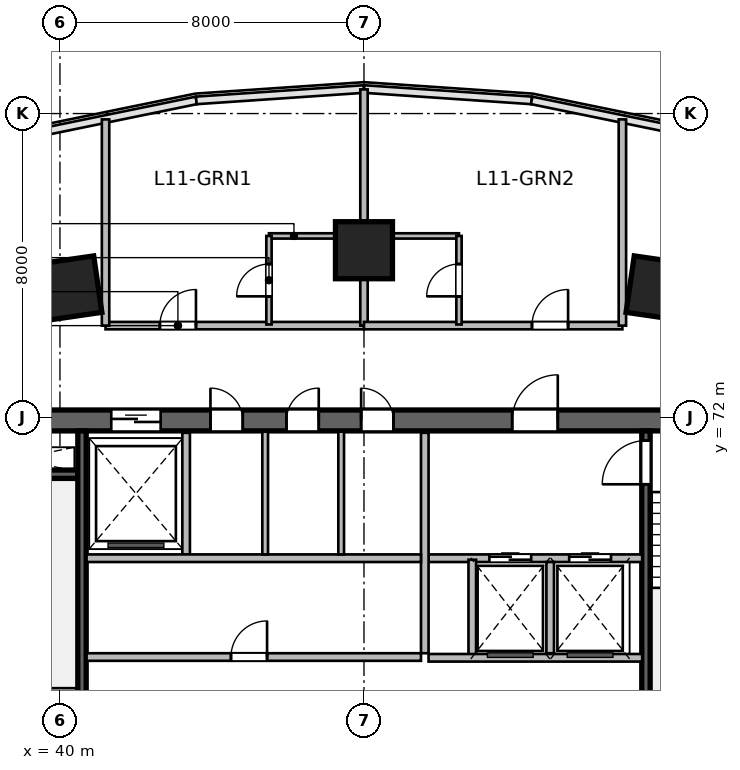
"""IFC4 building model, lengths in metres.
Left out: names, types, materials, properties, quantities, classifications, styles, units other than length and angle.
Written with IfcOpenShell. Run it as: python <this file> out.ifc"""

import sys

from ifc_helpers import new_model, si_unit, direction, frame, frame_2d, origin, origin_2d, place, context, subcontext, project, spatial, rectangle, extrude, source, transform, mapped, element, fill, save


model = new_model("IFC4")
c1 = context("Model", 3, precision=1e-05, world=origin(), true_north=direction((0.0, 1.0)))
c2 = subcontext(c1, "Body", "Model", "MODEL_VIEW")
j1 = project(units=[si_unit("LENGTHUNIT", "METRE"), si_unit("PLANEANGLEUNIT", "RADIAN")], contexts=[c1])
p1 = place(None, origin())
s1 = spatial("IfcSite", under=j1, at=p1, CompositionType="ELEMENT")
p2 = place(p1, origin())
s2 = spatial("IfcBuilding", under=s1, at=p2, CompositionType="ELEMENT")
p3 = place(p2, frame((0.0, 0.0, 53.4)))
s3 = spatial("IfcBuildingStorey", under=s2, at=p3, CompositionType="ELEMENT", Elevation=53.4)
m1 = source(origin(), c2, "Body", "SweptSolid", [
    extrude(rectangle(XDim=21.6, YDim=0.55, at=frame_2d((10.8, 0.0))), origin(), (0.0, 0.0, 1.0), 3.6),
])
p4 = place(p3, frame((37.2, 71.925, 0.0), z_axis=(0.0, 0.0, 1.0), x_axis=(1.0, 0.0, 0.0)))
e1 = element("IfcWall", 1, at=p4, inside=s3, PredefinedType="SHEAR", context=c2, shape_type="MappedRepresentation", body=[
    mapped(m1, transform((0.0, 0.0, 0.0), scale=1.0)),
])
p5 = place(p4, frame((1.2, 0.0, 0.0)))
e2 = element("IfcOpeningElement", 2, at=p5, cuts=e1, PredefinedType="OPENING", context=c2, shape_type="SweptSolid", body=[
    extrude(rectangle(XDim=0.9, YDim=2.1, at=frame_2d((0.45, 1.05))), frame((0.0, 0.285, 0.0), z_axis=(0.0, -1.0, 0.0), x_axis=(1.0, 0.0, 0.0)), (0.0, 0.0, 1.0), 0.57),
])
p6 = place(p4, frame((14.7, 0.0, 0.0)))
e3 = element("IfcOpeningElement", 3, at=p6, cuts=e1, PredefinedType="OPENING", context=c2, shape_type="SweptSolid", body=[
    extrude(rectangle(XDim=1.2, YDim=2.15, at=frame_2d((0.6, 1.075))), frame((0.0, 0.285, 0.0), z_axis=(0.0, -1.0, 0.0), x_axis=(1.0, 0.0, 0.0)), (0.0, 0.0, 1.0), 0.57),
])
p7 = place(p4, frame((4.15, 0.0, 0.0)))
e4 = element("IfcOpeningElement", 4, at=p7, cuts=e1, PredefinedType="OPENING", context=c2, shape_type="SweptSolid", body=[
    extrude(rectangle(XDim=1.3, YDim=2.15, at=frame_2d((0.65, 1.075))), frame((0.0, 0.285, 0.0), z_axis=(0.0, -1.0, 0.0), x_axis=(1.0, 0.0, 0.0)), (0.0, 0.0, 1.0), 0.57),
])
p8 = place(p4, frame((6.76, 0.0, 0.0)))
e5 = element("IfcOpeningElement", 5, at=p8, cuts=e1, PredefinedType="OPENING", context=c2, shape_type="SweptSolid", body=[
    extrude(rectangle(XDim=0.85, YDim=2.1, at=frame_2d((0.425, 1.05))), frame((0.0, 0.285, 0.0), z_axis=(0.0, -1.0, 0.0), x_axis=(1.0, 0.0, 0.0)), (0.0, 0.0, 1.0), 0.57),
])
p9 = place(p4, frame((8.76, 0.0, 0.0)))
e6 = element("IfcOpeningElement", 6, at=p9, cuts=e1, PredefinedType="OPENING", context=c2, shape_type="SweptSolid", body=[
    extrude(rectangle(XDim=0.85, YDim=2.1, at=frame_2d((0.425, 1.05))), frame((0.0, 0.285, 0.0), z_axis=(0.0, -1.0, 0.0), x_axis=(1.0, 0.0, 0.0)), (0.0, 0.0, 1.0), 0.57),
])
p10 = place(p4, frame((10.725, 0.0, 0.0)))
e7 = element("IfcOpeningElement", 7, at=p10, cuts=e1, PredefinedType="OPENING", context=c2, shape_type="SweptSolid", body=[
    extrude(rectangle(XDim=0.85, YDim=2.1, at=frame_2d((0.425, 1.05))), frame((0.0, 0.285, 0.0), z_axis=(0.0, -1.0, 0.0), x_axis=(1.0, 0.0, 0.0)), (0.0, 0.0, 1.0), 0.57),
])
m2 = source(origin(), c2, "Body", "SweptSolid", [
    extrude(rectangle(XDim=3.27, YDim=0.22, at=frame_2d((1.635, 0.0))), origin(), (0.0, 0.0, 1.0), 3.6),
])
p11 = place(p3, frame((37.2, 70.51, 0.0), z_axis=(0.0, 0.0, 1.0), x_axis=(1.0, 0.0, 0.0)))
e8 = element("IfcWall", 8, at=p11, inside=s3, PredefinedType="SHEAR", context=c2, shape_type="MappedRepresentation", body=[
    mapped(m2, transform((0.0, 0.0, 0.0), scale=1.0)),
])
m3 = source(origin(), c2, "Body", "SweptSolid", [
    extrude(rectangle(XDim=10.9, YDim=0.22, at=frame_2d((5.45, 0.0))), origin(), (0.0, 0.0, 1.0), 3.6),
])
p12 = place(p3, frame((40.58, 60.75, 0.0), z_axis=(0.0, 0.0, 1.0), x_axis=(0.0, 1.0, 0.0)))
e9 = element("IfcWall", 9, at=p12, inside=s3, PredefinedType="SHEAR", context=c2, shape_type="MappedRepresentation", body=[
    mapped(m3, transform((0.0, 0.0, 0.0), scale=1.0)),
])
p13 = place(p3, frame((55.42, 60.75, 0.0), z_axis=(0.0, 0.0, 1.0), x_axis=(0.0, 1.0, 0.0)))
e10 = element("IfcWall", 10, at=p13, inside=s3, PredefinedType="SHEAR", context=c2, shape_type="MappedRepresentation", body=[
    mapped(m3, transform((0.0, 0.0, 0.0), scale=1.0)),
])
p14 = place(p13, frame((9.495, 0.0, 0.0)))
e11 = element("IfcOpeningElement", 11, at=p14, cuts=e10, PredefinedType="OPENING", context=c2, shape_type="SweptSolid", body=[
    extrude(rectangle(XDim=1.15, YDim=2.15, at=frame_2d((0.575, 1.075))), frame((0.0, 0.12, 0.0), z_axis=(0.0, -1.0, 0.0), x_axis=(1.0, 0.0, 0.0)), (0.0, 0.0, 1.0), 0.24),
])
m4 = source(origin(), c2, "Body", "SweptSolid", [
    extrude(rectangle(XDim=1.5, YDim=1.5, at=origin_2d()), origin(), (0.0, 0.0, 1.0), 3.6),
])
for number, where, z_axis, x_axis in (
    (12, (40.253, 75.404, 0.0), (0.0, 0.0, 1.0), (-0.143, 0.99, 0.0)),
    (13, (48.0, 76.404, 0.0), (0.0, 0.0, 1.0), (0.0, 1.0, 0.0)),
    (14, (55.747, 75.404, 0.0), (0.0, 0.0, 1.0), (0.143, 0.99, 0.0)),
):
    element("IfcColumn", number, at=place(p3, frame(where, z_axis=z_axis, x_axis=x_axis)), inside=s3, PredefinedType="COLUMN", context=c2, shape_type="MappedRepresentation", body=[
        mapped(m4, transform((0.0, 0.0, 0.0), scale=1.0)),
    ])
m5 = source(origin(), c2, "Body", "SweptSolid", [
    extrude(rectangle(XDim=5.62, YDim=0.2, at=frame_2d((2.81, 0.0))), origin(), (0.0, 0.0, 1.0), 3.36),
])
p15 = place(p3, frame((49.7, 68.3, 0.0), z_axis=(0.0, 0.0, 1.0), x_axis=(1.0, 0.0, 0.0)))
e15 = element("IfcWall", 15, at=p15, inside=s3, PredefinedType="SOLIDWALL", context=c2, shape_type="MappedRepresentation", body=[
    mapped(m5, transform((0.0, 0.0, 0.0), scale=1.0)),
])
p16 = place(p15, frame((1.6, 0.0, 0.0)))
e16 = element("IfcOpeningElement", 16, at=p16, cuts=e15, PredefinedType="OPENING", context=c2, shape_type="SweptSolid", body=[
    extrude(rectangle(XDim=1.1, YDim=2.15, at=frame_2d((0.55, 1.075))), frame((0.0, 0.11, 0.0), z_axis=(0.0, -1.0, 0.0), x_axis=(1.0, 0.0, 0.0)), (0.0, 0.0, 1.0), 0.22),
])
p17 = place(p15, frame((3.7, 0.0, 0.0)))
e17 = element("IfcOpeningElement", 17, at=p17, cuts=e15, PredefinedType="OPENING", context=c2, shape_type="SweptSolid", body=[
    extrude(rectangle(XDim=1.1, YDim=2.15, at=frame_2d((0.55, 1.075))), frame((0.0, 0.11, 0.0), z_axis=(0.0, -1.0, 0.0), x_axis=(1.0, 0.0, 0.0)), (0.0, 0.0, 1.0), 0.22),
])
m6 = source(origin(), c2, "Body", "SweptSolid", [
    extrude(rectangle(XDim=5.8, YDim=0.2, at=frame_2d((2.9, 0.0))), origin(), (0.0, 0.0, 1.0), 3.36),
])
p18 = place(p3, frame((49.6, 65.8, 0.0), z_axis=(0.0, 0.0, 1.0), x_axis=(0.0, 1.0, 0.0)))
e18 = element("IfcWall", 18, at=p18, inside=s3, PredefinedType="SOLIDWALL", context=c2, shape_type="MappedRepresentation", body=[
    mapped(m6, transform((0.0, 0.0, 0.0), scale=1.0)),
])
m7 = source(origin(), c2, "Body", "SweptSolid", [
    extrude(rectangle(XDim=2.58, YDim=0.2, at=frame_2d((1.29, 0.0))), origin(), (0.0, 0.0, 1.0), 3.36),
])
p19 = place(p3, frame((50.85, 65.68, 0.0), z_axis=(0.0, 0.0, 1.0), x_axis=(0.0, 1.0, 0.0)))
e19 = element("IfcWall", 19, at=p19, inside=s3, PredefinedType="SOLIDWALL", context=c2, shape_type="MappedRepresentation", body=[
    mapped(m7, transform((0.0, 0.0, 0.0), scale=1.0)),
])
m8 = source(origin(), c2, "Body", "SweptSolid", [
    extrude(rectangle(XDim=2.4, YDim=0.2, at=frame_2d((1.2, 0.0))), origin(), (0.0, 0.0, 1.0), 3.36),
])
p20 = place(p3, frame((52.9, 65.8, 0.0), z_axis=(0.0, 0.0, 1.0), x_axis=(0.0, 1.0, 0.0)))
e20 = element("IfcWall", 20, at=p20, inside=s3, PredefinedType="SOLIDWALL", context=c2, shape_type="MappedRepresentation", body=[
    mapped(m8, transform((0.0, 0.0, 0.0), scale=1.0)),
])
p21 = place(p3, frame((49.7, 65.68, 0.0), z_axis=(0.0, 0.0, 1.0), x_axis=(1.0, 0.0, 0.0)))
e21 = element("IfcWall", 21, at=p21, inside=s3, PredefinedType="SOLIDWALL", context=c2, shape_type="MappedRepresentation", body=[
    mapped(m5, transform((0.0, 0.0, 0.0), scale=1.0)),
])
m9 = source(origin(), c2, "Body", "SweptSolid", [
    extrude(rectangle(XDim=3.2, YDim=0.2, at=frame_2d((1.6, 0.0))), origin(), (0.0, 0.0, 1.0), 3.36),
])
p22 = place(p3, frame((43.32, 68.4, 0.0), z_axis=(0.0, 0.0, 1.0), x_axis=(0.0, 1.0, 0.0)))
e22 = element("IfcWall", 22, at=p22, inside=s3, PredefinedType="SOLIDWALL", context=c2, shape_type="MappedRepresentation", body=[
    mapped(m9, transform((0.0, 0.0, 0.0), scale=1.0)),
])
m10 = source(origin(), c2, "Body", "SweptSolid", [
    extrude(rectangle(XDim=8.8, YDim=0.2, at=frame_2d((4.4, 0.0))), origin(), (0.0, 0.0, 1.0), 3.36),
])
p23 = place(p3, frame((40.7, 68.3, 0.0), z_axis=(0.0, 0.0, 1.0), x_axis=(1.0, 0.0, 0.0)))
e23 = element("IfcWall", 23, at=p23, inside=s3, PredefinedType="SOLIDWALL", context=c2, shape_type="MappedRepresentation", body=[
    mapped(m10, transform((0.0, 0.0, 0.0), scale=1.0)),
])
m11 = source(origin(), c2, "Body", "SweptSolid", [
    extrude(rectangle(XDim=3.23, YDim=0.15, at=frame_2d((1.615, 0.0))), origin(), (0.0, 0.0, 1.0), 3.36),
])
for number, where, z_axis, x_axis in (
    (24, (45.4, 68.4, 0.0), (0.0, 0.0, 1.0), (0.0, 1.0, 0.0)),
    (25, (47.4, 68.4, 0.0), (0.0, 0.0, 1.0), (0.0, 1.0, 0.0)),
):
    element("IfcWall", number, at=place(p3, frame(where, z_axis=z_axis, x_axis=x_axis)), inside=s3, PredefinedType="PARTITIONING", context=c2, shape_type="MappedRepresentation", body=[
        mapped(m11, transform((0.0, 0.0, 0.0), scale=1.0)),
    ])
p24 = place(p3, frame((40.7, 65.7, 0.0), z_axis=(0.0, 0.0, 1.0), x_axis=(1.0, 0.0, 0.0)))
e26 = element("IfcWall", 26, at=p24, inside=s3, PredefinedType="SOLIDWALL", context=c2, shape_type="MappedRepresentation", body=[
    mapped(m10, transform((0.0, 0.0, 0.0), scale=1.0)),
])
p25 = place(p24, frame((3.8, 0.0, 0.0)))
e27 = element("IfcOpeningElement", 27, at=p25, cuts=e26, PredefinedType="OPENING", context=c2, shape_type="SweptSolid", body=[
    extrude(rectangle(XDim=0.95, YDim=2.15, at=frame_2d((0.475, 1.075))), frame((0.0, 0.11, 0.0), z_axis=(0.0, -1.0, 0.0), x_axis=(1.0, 0.0, 0.0)), (0.0, 0.0, 1.0), 0.22),
])
m12 = source(origin(), c2, "Body", "SweptSolid", [
    extrude(rectangle(XDim=6.8, YDim=0.195, at=frame_2d((3.4, 0.0))), origin(), (0.0, 0.0, 1.0), 3.36),
])
p26 = place(p3, frame((41.2, 74.42, 0.0), z_axis=(0.0, 0.0, 1.0), x_axis=(1.0, 0.0, 0.0)))
e28 = element("IfcWall", 28, at=p26, inside=s3, PredefinedType="PARTITIONING", context=c2, shape_type="MappedRepresentation", body=[
    mapped(m12, transform((0.0, 0.0, 0.0), scale=1.0)),
])
p27 = place(p26, frame((1.429, 0.0, 0.0)))
e29 = element("IfcOpeningElement", 29, at=p27, cuts=e28, PredefinedType="OPENING", context=c2, shape_type="SweptSolid", body=[
    extrude(rectangle(XDim=0.95, YDim=2.15, at=frame_2d((0.475, 1.075))), frame((0.0, 0.107, 0.0), z_axis=(0.0, -1.0, 0.0), x_axis=(1.0, 0.0, 0.0)), (0.0, 0.0, 1.0), 0.215),
])
m13 = source(origin(), c2, "Body", "SweptSolid", [
    extrude(rectangle(XDim=6.216, YDim=0.195, at=frame_2d((3.108, 0.0))), origin(), (0.0, 0.0, 1.0), 2.644),
])
p28 = place(p3, frame((48.0, 74.42, 0.0), z_axis=(0.0, 0.0, 1.0), x_axis=(0.0, 1.0, 0.0)))
e30 = element("IfcWall", 30, at=p28, inside=s3, PredefinedType="PARTITIONING", context=c2, shape_type="MappedRepresentation", body=[
    mapped(m13, transform((0.0, 0.0, 0.0), scale=1.0)),
])
m14 = source(origin(), c2, "Body", "SweptSolid", [
    extrude(rectangle(XDim=5.426, YDim=0.195, at=frame_2d((2.713, 0.0))), origin(), (0.0, 0.0, 1.0), 3.36),
])
p29 = place(p3, frame((41.2, 74.42, 0.0), z_axis=(0.0, 0.0, 1.0), x_axis=(0.0, 1.0, 0.0)))
e31 = element("IfcWall", 31, at=p29, inside=s3, PredefinedType="PARTITIONING", context=c2, shape_type="MappedRepresentation", body=[
    mapped(m14, transform((0.0, 0.0, 0.0), scale=1.0)),
])
m15 = source(origin(), c2, "Body", "SweptSolid", [
    extrude(rectangle(XDim=2.35, YDim=0.14, at=frame_2d((1.175, 0.0))), origin(), (0.0, 0.0, 1.0), 3.36),
])
p30 = place(p3, frame((45.5, 76.78, 0.0), z_axis=(0.0, 0.0, 1.0), x_axis=(1.0, 0.0, 0.0)))
e32 = element("IfcWall", 32, at=p30, inside=s3, PredefinedType="PARTITIONING", context=c2, shape_type="MappedRepresentation", body=[
    mapped(m15, transform((0.0, 0.0, 0.0), scale=1.0)),
])
m16 = source(origin(), c2, "Body", "SweptSolid", [
    extrude(rectangle(XDim=2.33, YDim=0.14, at=frame_2d((1.165, 0.0))), origin(), (0.0, 0.0, 1.0), 3.36),
])
p31 = place(p3, frame((45.5, 74.45, 0.0), z_axis=(0.0, 0.0, 1.0), x_axis=(0.0, 1.0, 0.0)))
e33 = element("IfcWall", 33, at=p31, inside=s3, PredefinedType="PARTITIONING", context=c2, shape_type="MappedRepresentation", body=[
    mapped(m16, transform((0.0, 0.0, 0.0), scale=1.0)),
])
p32 = place(p31, frame((0.74, 0.0, 0.0)))
e34 = element("IfcOpeningElement", 34, at=p32, cuts=e33, PredefinedType="OPENING", context=c2, shape_type="SweptSolid", body=[
    extrude(rectangle(XDim=0.85, YDim=2.05, at=frame_2d((0.425, 1.025))), frame((0.0, 0.08, 0.0), z_axis=(0.0, -1.0, 0.0), x_axis=(1.0, 0.0, 0.0)), (0.0, 0.0, 1.0), 0.16),
])
p33 = place(p3, frame((48.0, 74.42, 0.0), z_axis=(0.0, 0.0, 1.0), x_axis=(1.0, 0.0, 0.0)))
e35 = element("IfcWall", 35, at=p33, inside=s3, PredefinedType="PARTITIONING", context=c2, shape_type="MappedRepresentation", body=[
    mapped(m12, transform((0.0, 0.0, 0.0), scale=1.0)),
])
p34 = place(p33, frame((4.421, 0.0, 0.0)))
e36 = element("IfcOpeningElement", 36, at=p34, cuts=e35, PredefinedType="OPENING", context=c2, shape_type="SweptSolid", body=[
    extrude(rectangle(XDim=0.95, YDim=2.15, at=frame_2d((0.475, 1.075))), frame((0.0, 0.107, 0.0), z_axis=(0.0, -1.0, 0.0), x_axis=(1.0, 0.0, 0.0)), (0.0, 0.0, 1.0), 0.215),
])
p35 = place(p3, frame((54.8, 74.42, 0.0), z_axis=(0.0, 0.0, 1.0), x_axis=(0.0, 1.0, 0.0)))
e37 = element("IfcWall", 37, at=p35, inside=s3, PredefinedType="PARTITIONING", context=c2, shape_type="MappedRepresentation", body=[
    mapped(m14, transform((0.0, 0.0, 0.0), scale=1.0)),
])
p36 = place(p3, frame((48.15, 76.78, 0.0), z_axis=(0.0, 0.0, 1.0), x_axis=(1.0, 0.0, 0.0)))
e38 = element("IfcWall", 38, at=p36, inside=s3, PredefinedType="PARTITIONING", context=c2, shape_type="MappedRepresentation", body=[
    mapped(m15, transform((0.0, 0.0, 0.0), scale=1.0)),
])
p37 = place(p3, frame((50.5, 74.45, 0.0), z_axis=(0.0, 0.0, 1.0), x_axis=(0.0, 1.0, 0.0)))
e39 = element("IfcWall", 39, at=p37, inside=s3, PredefinedType="PARTITIONING", context=c2, shape_type="MappedRepresentation", body=[
    mapped(m16, transform((0.0, 0.0, 0.0), scale=1.0)),
])
p38 = place(p37, frame((0.74, 0.0, 0.0)))
e40 = element("IfcOpeningElement", 40, at=p38, cuts=e39, PredefinedType="OPENING", context=c2, shape_type="SweptSolid", body=[
    extrude(rectangle(XDim=0.85, YDim=2.05, at=frame_2d((0.425, 1.025))), frame((0.0, 0.08, 0.0), z_axis=(0.0, -1.0, 0.0), x_axis=(1.0, 0.0, 0.0)), (0.0, 0.0, 1.0), 0.16),
])
m17 = source(origin(), c2, "Body", "SweptSolid", [
    extrude(rectangle(XDim=1.15, YDim=2.15, at=frame_2d((0.575, 1.075))), frame((0.0, 0.025, 0.0), z_axis=(0.0, -1.0, 0.0), x_axis=(1.0, 0.0, 0.0)), (0.0, 0.0, 1.0), 0.05),
])
p39 = place(p14, origin())
e41 = element("IfcDoor", 41, at=p39, inside=s3, OperationType="SINGLE_SWING_LEFT", PredefinedType="DOOR", context=c2, shape_type="MappedRepresentation", body=[
    mapped(m17, transform((0.0, 0.0, 0.0), scale=1.0)),
])
fill(e11, e41)
m18 = source(origin(), c2, "Body", "SweptSolid", [
    extrude(rectangle(XDim=1.2, YDim=2.15, at=frame_2d((0.6, 1.075))), frame((0.0, 0.025, 0.0), z_axis=(0.0, -1.0, 0.0), x_axis=(1.0, 0.0, 0.0)), (0.0, 0.0, 1.0), 0.05),
])
p40 = place(p6, origin())
e42 = element("IfcDoor", 42, at=p40, inside=s3, OperationType="SINGLE_SWING_RIGHT", PredefinedType="DOOR", context=c2, shape_type="MappedRepresentation", body=[
    mapped(m18, transform((0.0, 0.0, 0.0), scale=1.0)),
])
fill(e3, e42)
m19 = source(origin(), c2, "Body", "SweptSolid", [
    extrude(rectangle(XDim=1.1, YDim=2.15, at=frame_2d((0.55, 1.075))), frame((0.0, 0.025, 0.0), z_axis=(0.0, -1.0, 0.0), x_axis=(1.0, 0.0, 0.0)), (0.0, 0.0, 1.0), 0.05),
])
p41 = place(p16, origin())
e43 = element("IfcDoor", 43, at=p41, inside=s3, OperationType="DOUBLE_DOOR_SLIDING", PredefinedType="DOOR", context=c2, shape_type="MappedRepresentation", body=[
    mapped(m19, transform((0.0, 0.0, 0.0), scale=1.0)),
])
fill(e16, e43)
p42 = place(p17, origin())
e44 = element("IfcDoor", 44, at=p42, inside=s3, OperationType="DOUBLE_DOOR_SLIDING", PredefinedType="DOOR", context=c2, shape_type="MappedRepresentation", body=[
    mapped(m19, transform((0.0, 0.0, 0.0), scale=1.0)),
])
fill(e17, e44)
m20 = source(origin(), c2, "Body", "SweptSolid", [
    extrude(rectangle(XDim=1.3, YDim=2.15, at=frame_2d((0.65, 1.075))), frame((0.0, 0.025, 0.0), z_axis=(0.0, -1.0, 0.0), x_axis=(1.0, 0.0, 0.0)), (0.0, 0.0, 1.0), 0.05),
])
p43 = place(p7, origin())
e45 = element("IfcDoor", 45, at=p43, inside=s3, OperationType="DOUBLE_DOOR_SLIDING", PredefinedType="DOOR", context=c2, shape_type="MappedRepresentation", body=[
    mapped(m20, transform((0.0, 0.0, 0.0), scale=1.0)),
])
fill(e4, e45)
m21 = source(origin(), c2, "Body", "SweptSolid", [
    extrude(rectangle(XDim=0.85, YDim=2.1, at=frame_2d((0.425, 1.05))), frame((0.0, 0.025, 0.0), z_axis=(0.0, -1.0, 0.0), x_axis=(1.0, 0.0, 0.0)), (0.0, 0.0, 1.0), 0.05),
])
p44 = place(p8, origin())
e46 = element("IfcDoor", 46, at=p44, inside=s3, OperationType="SINGLE_SWING_LEFT", PredefinedType="DOOR", context=c2, shape_type="MappedRepresentation", body=[
    mapped(m21, transform((0.0, 0.0, 0.0), scale=1.0)),
])
fill(e5, e46)
p45 = place(p9, origin())
e47 = element("IfcDoor", 47, at=p45, inside=s3, OperationType="SINGLE_SWING_RIGHT", PredefinedType="DOOR", context=c2, shape_type="MappedRepresentation", body=[
    mapped(m21, transform((0.0, 0.0, 0.0), scale=1.0)),
])
fill(e6, e47)
p46 = place(p10, origin())
e48 = element("IfcDoor", 48, at=p46, inside=s3, OperationType="SINGLE_SWING_LEFT", PredefinedType="DOOR", context=c2, shape_type="MappedRepresentation", body=[
    mapped(m21, transform((0.0, 0.0, 0.0), scale=1.0)),
])
fill(e7, e48)
m22 = source(origin(), c2, "Body", "SweptSolid", [
    extrude(rectangle(XDim=0.95, YDim=2.15, at=frame_2d((0.475, 1.075))), frame((0.0, 0.025, 0.0), z_axis=(0.0, -1.0, 0.0), x_axis=(1.0, 0.0, 0.0)), (0.0, 0.0, 1.0), 0.05),
])
p47 = place(p25, origin())
e49 = element("IfcDoor", 49, at=p47, inside=s3, OperationType="SINGLE_SWING_RIGHT", PredefinedType="DOOR", context=c2, shape_type="MappedRepresentation", body=[
    mapped(m22, transform((0.0, 0.0, 0.0), scale=1.0)),
])
fill(e27, e49)
p48 = place(p27, origin())
e50 = element("IfcDoor", 50, at=p48, inside=s3, OperationType="SINGLE_SWING_RIGHT", PredefinedType="DOOR", context=c2, shape_type="MappedRepresentation", body=[
    mapped(m22, transform((0.0, 0.0, 0.0), scale=1.0)),
])
fill(e29, e50)
m23 = source(origin(), c2, "Body", "SweptSolid", [
    extrude(rectangle(XDim=0.85, YDim=2.05, at=frame_2d((0.425, 1.025))), frame((0.0, 0.025, 0.0), z_axis=(0.0, -1.0, 0.0), x_axis=(1.0, 0.0, 0.0)), (0.0, 0.0, 1.0), 0.05),
])
p49 = place(p32, origin())
e51 = element("IfcDoor", 51, at=p49, inside=s3, OperationType="SINGLE_SWING_LEFT", PredefinedType="DOOR", context=c2, shape_type="MappedRepresentation", body=[
    mapped(m23, transform((0.0, 0.0, 0.0), scale=1.0)),
])
fill(e34, e51)
p50 = place(p34, origin())
e52 = element("IfcDoor", 52, at=p50, inside=s3, OperationType="SINGLE_SWING_RIGHT", PredefinedType="DOOR", context=c2, shape_type="MappedRepresentation", body=[
    mapped(m22, transform((0.0, 0.0, 0.0), scale=1.0)),
])
fill(e36, e52)
p51 = place(p38, origin())
e53 = element("IfcDoor", 53, at=p51, inside=s3, OperationType="SINGLE_SWING_LEFT", PredefinedType="DOOR", context=c2, shape_type="MappedRepresentation", body=[
    mapped(m23, transform((0.0, 0.0, 0.0), scale=1.0)),
])
fill(e40, e53)
save(model, sys.argv[1])
